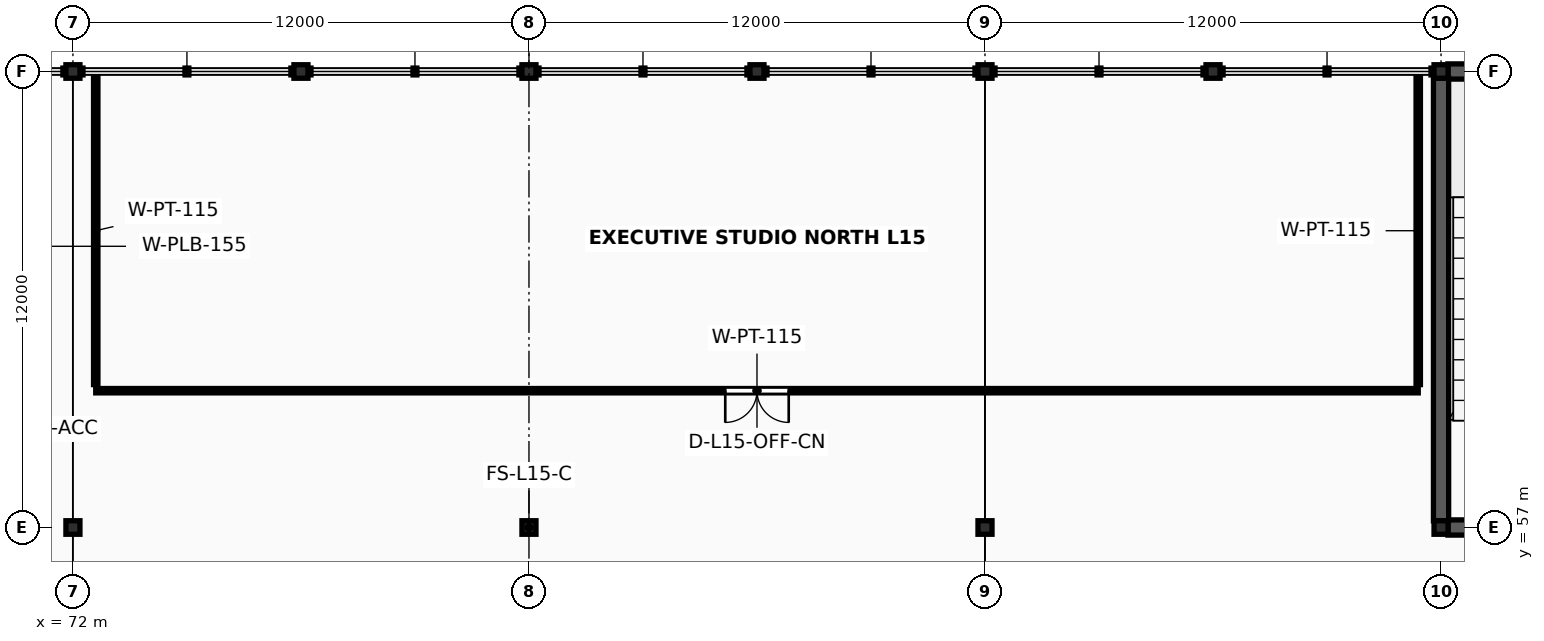
"""IFC4 building model, lengths in metres.
Left out: names, types, materials, properties, quantities, classifications, styles, units other than length and angle.
Written with IfcOpenShell. Run it as: python <this file> out.ifc"""

import sys

from ifc_helpers import new_model, si_unit, direction, frame, frame_2d, origin, origin_2d, place, context, subcontext, project, spatial, rectangle, i_section, extrude, element, fill, save


model = new_model("IFC4")
c1 = context("Model", 3, precision=1e-05, world=origin(), true_north=direction((0.0, 1.0)))
c2 = subcontext(c1, "Body", "Model", "MODEL_VIEW")
j1 = project(units=[si_unit("LENGTHUNIT", "METRE"), si_unit("PLANEANGLEUNIT", "RADIAN")], contexts=[c1])
p1 = place(None, origin())
s1 = spatial("IfcSite", under=j1, at=p1, CompositionType="ELEMENT")
p2 = place(p1, origin())
s2 = spatial("IfcBuilding", under=s1, at=p2, CompositionType="ELEMENT")
p3 = place(p2, frame((0.0, 0.0, 61.6)))
s3 = spatial("IfcBuildingStorey", under=s2, at=p3, CompositionType="ELEMENT", Elevation=61.6)
for number, where, z_axis, x_axis in (
    (1, (72.0, 57.0, 0.0), (0.0, 0.0, 1.0), (1.0, 0.0, 0.0)),
    (2, (72.0, 69.0, 0.0), (0.0, 0.0, 1.0), (1.0, 0.0, 0.0)),
    (3, (84.0, 57.0, 0.0), (0.0, 0.0, 1.0), (1.0, 0.0, 0.0)),
    (4, (84.0, 69.0, 0.0), (0.0, 0.0, 1.0), (1.0, 0.0, 0.0)),
    (5, (96.0, 57.0, 0.0), (0.0, 0.0, 1.0), (1.0, 0.0, 0.0)),
    (6, (96.0, 69.0, 0.0), (0.0, 0.0, 1.0), (1.0, 0.0, 0.0)),
    (7, (108.0, 57.0, 0.0), (0.0, 0.0, 1.0), (1.0, 0.0, 0.0)),
    (8, (108.0, 69.0, 0.0), (0.0, 0.0, 1.0), (1.0, 0.0, 0.0)),
    (9, (78.0, 69.0, 0.0), (0.0, 0.0, 1.0), (1.0, 0.0, 0.0)),
    (10, (90.0, 69.0, 0.0), (0.0, 0.0, 1.0), (1.0, 0.0, 0.0)),
    (11, (102.0, 69.0, 0.0), (0.0, 0.0, 1.0), (1.0, 0.0, 0.0)),
):
    element("IfcColumn", number, at=place(p3, frame(where, z_axis=z_axis, x_axis=x_axis)), inside=s3, PredefinedType="COLUMN", context=c2, shape_type="SweptSolid", body=[
        extrude(i_section(OverallWidth=0.369, OverallDepth=0.356, WebThickness=0.011, FlangeThickness=0.018, FilletRadius=0.018, at=origin_2d()), origin(), (0.0, 0.0, 1.0), 4.0),
    ])
p4 = place(p3, frame((108.181, 57.0, 0.0), z_axis=(0.0, 0.0, 1.0), x_axis=(1.0, 0.0, 0.0)))
e12 = element("IfcWall", 12, at=p4, inside=s3, PredefinedType="SHEAR", context=c2, shape_type="SweptSolid", body=[
    extrude(rectangle(XDim=11.637, YDim=0.4, at=frame_2d((5.819, 0.0))), origin(), (0.0, 0.0, 1.0), 3.843),
])
p5 = place(p4, frame((5.019, 0.0, 0.0)))
e13 = element("IfcOpeningElement", 13, at=p5, cuts=e12, PredefinedType="OPENING", context=c2, shape_type="SweptSolid", body=[
    extrude(rectangle(XDim=1.2, YDim=2.2, at=frame_2d((0.6, 1.1))), frame((0.0, 0.215, 0.0), z_axis=(0.0, -1.0, 0.0), x_axis=(1.0, 0.0, 0.0)), (0.0, 0.0, 1.0), 0.43),
])
p6 = place(p4, frame((8.719, 0.0, 0.0)))
e14 = element("IfcOpeningElement", 14, at=p6, cuts=e12, PredefinedType="OPENING", context=c2, shape_type="SweptSolid", body=[
    extrude(rectangle(XDim=1.5, YDim=2.25, at=frame_2d((0.75, 1.125))), frame((0.0, 0.215, 0.0), z_axis=(0.0, -1.0, 0.0), x_axis=(1.0, 0.0, 0.0)), (0.0, 0.0, 1.0), 0.43),
])
p7 = place(p3, frame((108.181, 69.0, 0.0), z_axis=(0.0, 0.0, 1.0), x_axis=(1.0, 0.0, 0.0)))
e15 = element("IfcWall", 15, at=p7, inside=s3, PredefinedType="SHEAR", context=c2, shape_type="SweptSolid", body=[
    extrude(rectangle(XDim=11.637, YDim=0.4, at=frame_2d((5.819, 0.0))), origin(), (0.0, 0.0, 1.0), 3.843),
])
p8 = place(p3, frame((108.0, 57.175, 0.0), z_axis=(0.0, 0.0, 1.0), x_axis=(0.0, 1.0, 0.0)))
e16 = element("IfcWall", 16, at=p8, inside=s3, PredefinedType="SHEAR", context=c2, shape_type="SweptSolid", body=[
    extrude(rectangle(XDim=11.65, YDim=0.4, at=frame_2d((5.825, 0.0))), origin(), (0.0, 0.0, 1.0), 3.843),
])
p9 = place(p3, frame((72.6, 60.6, 0.0), z_axis=(0.0, 0.0, 1.0), x_axis=(1.0, 0.0, 0.0)))
e17 = element("IfcWall", 17, at=p9, inside=s3, PredefinedType="PARTITIONING", context=c2, shape_type="SweptSolid", body=[
    extrude(rectangle(XDim=34.8, YDim=0.115, at=frame_2d((17.4, 0.0))), origin(), (0.0, 0.0, 1.0), 2.88),
])
p10 = place(p9, frame((16.565, 0.0, 0.0)))
e18 = element("IfcOpeningElement", 18, at=p10, cuts=e17, PredefinedType="OPENING", context=c2, shape_type="SweptSolid", body=[
    extrude(rectangle(XDim=1.67, YDim=2.35, at=frame_2d((0.835, 1.175))), frame((0.0, 0.073, 0.0), z_axis=(0.0, -1.0, 0.0), x_axis=(1.0, 0.0, 0.0)), (0.0, 0.0, 1.0), 0.145),
])
for number, where, z_axis, x_axis in (
    (19, (72.6, 60.76, 0.0), (0.0, 0.0, 1.0), (0.0, 1.0, 0.0)),
    (20, (107.4, 60.76, 0.0), (0.0, 0.0, 1.0), (0.0, 1.0, 0.0)),
):
    element("IfcWall", number, at=place(p3, frame(where, z_axis=z_axis, x_axis=x_axis)), inside=s3, PredefinedType="PARTITIONING", context=c2, shape_type="SweptSolid", body=[
        extrude(rectangle(XDim=8.1, YDim=0.115, at=frame_2d((4.05, 0.0))), origin(), (0.0, 0.0, 1.0), 2.88),
    ])
p11 = place(p10, origin())
e21 = element("IfcDoor", 21, at=p11, inside=s3, OperationType="DOUBLE_DOOR_SINGLE_SWING", PredefinedType="DOOR", context=c2, shape_type="SweptSolid", body=[
    extrude(rectangle(XDim=1.67, YDim=2.35, at=frame_2d((0.835, 1.175))), frame((0.0, 0.025, 0.0), z_axis=(0.0, -1.0, 0.0), x_axis=(1.0, 0.0, 0.0)), (0.0, 0.0, 1.0), 0.05),
])
fill(e18, e21)
save(model, sys.argv[1])
